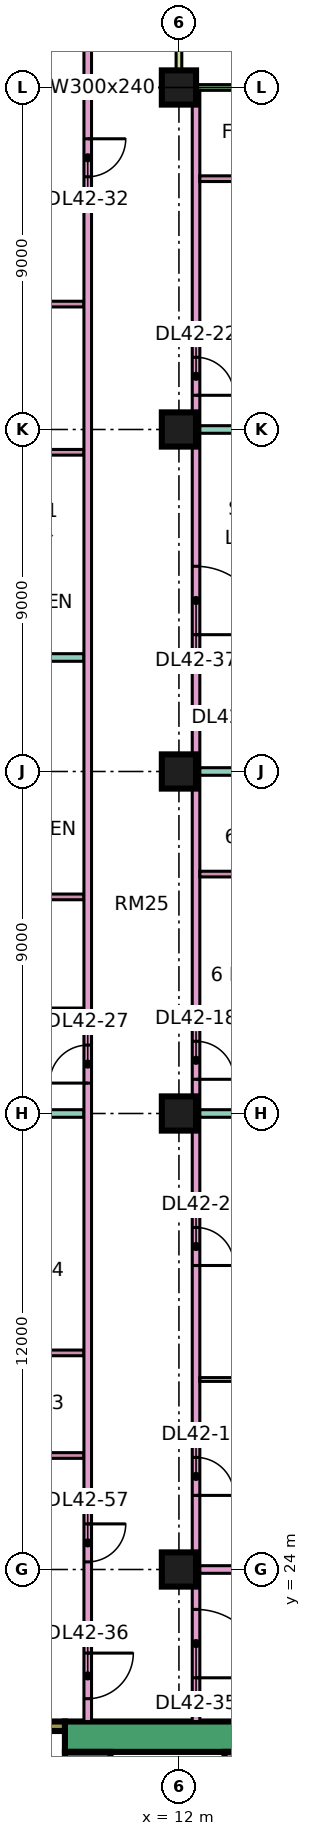
"""IFC4 building model, lengths in metres.
Left out: names, types, materials, properties, quantities, classifications, styles, units other than length and angle.
Written with IfcOpenShell. Run it as: python <this file> out.ifc"""

import sys

from ifc_helpers import new_model, si_unit, direction, frame, frame_2d, origin, origin_2d, place, context, subcontext, project, spatial, rectangle, extrude, element, fill, save


model = new_model("IFC4")
c1 = context("Model", 3, precision=1e-05, world=origin(), true_north=direction((0.0, 1.0)))
c2 = subcontext(c1, "Body", "Model", "MODEL_VIEW")
j1 = project(units=[si_unit("LENGTHUNIT", "METRE"), si_unit("PLANEANGLEUNIT", "RADIAN")], contexts=[c1])
p1 = place(None, origin())
s1 = spatial("IfcSite", under=j1, at=p1, CompositionType="ELEMENT")
p2 = place(p1, origin())
s2 = spatial("IfcBuilding", under=s1, at=p2, CompositionType="ELEMENT")
p3 = place(p2, frame((0.0, 0.0, 183.65)))
s3 = spatial("IfcBuildingStorey", under=s2, at=p3, CompositionType="ELEMENT", Elevation=183.65)
for number, where, z_axis, x_axis in (
    (1, (12.0, 24.0, 0.0), (0.0, 0.0, 1.0), (1.0, 0.0, 0.0)),
    (2, (12.0, 36.0, 0.0), (0.0, 0.0, 1.0), (1.0, 0.0, 0.0)),
    (3, (12.0, 45.0, 0.0), (0.0, 0.0, 1.0), (1.0, 0.0, 0.0)),
    (4, (12.0, 54.0, 0.0), (0.0, 0.0, 1.0), (1.0, 0.0, 0.0)),
    (5, (12.0, 63.0, 0.0), (0.0, 0.0, 1.0), (1.0, 0.0, 0.0)),
):
    element("IfcColumn", number, at=place(p3, frame(where, z_axis=z_axis, x_axis=x_axis)), inside=s3, PredefinedType="COLUMN", context=c2, shape_type="SweptSolid", body=[
        extrude(rectangle(XDim=0.9, YDim=0.9, at=origin_2d()), origin(), (0.0, 0.0, 1.0), 3.75),
    ])
p4 = place(p3, frame((9.0, 19.6, 0.0), z_axis=(0.0, 0.0, 1.0), x_axis=(1.0, 0.0, 0.0)))
e6 = element("IfcWall", 6, at=p4, inside=s3, PredefinedType="SHEAR", context=c2, shape_type="SweptSolid", body=[
    extrude(rectangle(XDim=25.0, YDim=0.8, at=frame_2d((12.5, 0.0))), origin(), (0.0, 0.0, 1.0), 3.75),
])
p5 = place(p4, frame((19.1, 0.0, 0.0)))
e7 = element("IfcOpeningElement", 7, at=p5, cuts=e6, PredefinedType="OPENING", context=c2, shape_type="SweptSolid", body=[
    extrude(rectangle(XDim=1.8, YDim=2.4, at=frame_2d((0.9, 1.2))), frame((0.0, 0.41, 0.0), z_axis=(0.0, -1.0, 0.0), x_axis=(1.0, 0.0, 0.0)), (0.0, 0.0, 1.0), 0.82),
])
p6 = place(p3, frame((9.6, 7.8, 0.0), z_axis=(0.0, 0.0, 1.0), x_axis=(0.0, 1.0, 0.0)))
e8 = element("IfcWall", 8, at=p6, inside=s3, PredefinedType="SHEAR", context=c2, shape_type="SweptSolid", body=[
    extrude(rectangle(XDim=11.4, YDim=1.2, at=frame_2d((5.7, 0.0))), origin(), (0.0, 0.0, 1.0), 3.75),
])
p7 = place(p6, frame((4.075, 0.0, 0.0)))
e9 = element("IfcOpeningElement", 9, at=p7, cuts=e8, PredefinedType="OPENING", context=c2, shape_type="SweptSolid", body=[
    extrude(rectangle(XDim=1.1, YDim=2.2, at=frame_2d((0.55, 1.1))), frame((0.0, 0.61, 0.0), z_axis=(0.0, -1.0, 0.0), x_axis=(1.0, 0.0, 0.0)), (0.0, 0.0, 1.0), 1.22),
])
p8 = place(p6, frame((6.575, 0.0, 0.0)))
e10 = element("IfcOpeningElement", 10, at=p8, cuts=e8, PredefinedType="OPENING", context=c2, shape_type="SweptSolid", body=[
    extrude(rectangle(XDim=1.1, YDim=2.2, at=frame_2d((0.55, 1.1))), frame((0.0, 0.61, 0.0), z_axis=(0.0, -1.0, 0.0), x_axis=(1.0, 0.0, 0.0)), (0.0, 0.0, 1.0), 1.22),
])
p9 = place(p6, frame((9.4, 0.0, 0.0)))
e11 = element("IfcOpeningElement", 11, at=p9, cuts=e8, PredefinedType="OPENING", context=c2, shape_type="SweptSolid", body=[
    extrude(rectangle(XDim=1.1, YDim=2.2, at=frame_2d((0.55, 1.1))), frame((0.0, 0.61, 0.0), z_axis=(0.0, -1.0, 0.0), x_axis=(1.0, 0.0, 0.0)), (0.0, 0.0, 1.0), 1.22),
])
p10 = place(p6, frame((1.75, 0.0, 0.0)))
e12 = element("IfcOpeningElement", 12, at=p10, cuts=e8, PredefinedType="OPENING", context=c2, shape_type="SweptSolid", body=[
    extrude(rectangle(XDim=0.9, YDim=2.1, at=frame_2d((0.45, 1.05))), frame((0.0, 0.61, 0.0), z_axis=(0.0, -1.0, 0.0), x_axis=(1.0, 0.0, 0.0)), (0.0, 0.0, 1.0), 1.22),
])
p11 = place(p3, frame((13.325, 7.8, 0.0), z_axis=(0.0, 0.0, 1.0), x_axis=(0.0, 1.0, 0.0)))
e13 = element("IfcWall", 13, at=p11, inside=s3, PredefinedType="SHEAR", context=c2, shape_type="SweptSolid", body=[
    extrude(rectangle(XDim=11.4, YDim=0.25, at=frame_2d((5.7, 0.0))), origin(), (0.0, 0.0, 1.0), 3.75),
])
p12 = place(p3, frame((2.1, 19.875, 0.0), z_axis=(0.0, 0.0, 1.0), x_axis=(1.0, 0.0, 0.0)))
e14 = element("IfcWall", 14, at=p12, inside=s3, PredefinedType="SHEAR", context=c2, shape_type="SweptSolid", body=[
    extrude(rectangle(XDim=6.9, YDim=0.25, at=frame_2d((3.45, 0.0))), origin(), (0.0, 0.0, 1.0), 3.75),
])
p13 = place(p12, frame((1.175, 0.0, 0.0)))
e15 = element("IfcOpeningElement", 15, at=p13, cuts=e14, PredefinedType="OPENING", context=c2, shape_type="SweptSolid", body=[
    extrude(rectangle(XDim=1.1, YDim=2.2, at=frame_2d((0.55, 1.1))), frame((0.0, 0.135, 0.0), z_axis=(0.0, -1.0, 0.0), x_axis=(1.0, 0.0, 0.0)), (0.0, 0.0, 1.0), 0.27),
])
p14 = place(p12, frame((4.6, 0.0, 0.0)))
e16 = element("IfcOpeningElement", 16, at=p14, cuts=e14, PredefinedType="OPENING", context=c2, shape_type="SweptSolid", body=[
    extrude(rectangle(XDim=1.2, YDim=2.2, at=frame_2d((0.6, 1.1))), frame((0.0, 0.135, 0.0), z_axis=(0.0, -1.0, 0.0), x_axis=(1.0, 0.0, 0.0)), (0.0, 0.0, 1.0), 0.27),
])
p15 = place(p3, frame((22.425, 63.0, 0.0), z_axis=(0.0, 0.0, 1.0), x_axis=(-1.0, 0.0, 0.0)))
e17 = element("IfcWall", 17, at=p15, inside=s3, PredefinedType="SOLIDWALL", context=c2, shape_type="SweptSolid", body=[
    extrude(rectangle(XDim=10.35, YDim=0.15, at=frame_2d((5.175, 0.0))), origin(), (0.0, 0.0, 1.0), 3.35),
])
p16 = place(p15, frame((0.788, 0.0, 0.0)))
e18 = element("IfcOpeningElement", 18, at=p16, cuts=e17, PredefinedType="OPENING", context=c2, shape_type="SweptSolid", body=[
    extrude(rectangle(XDim=1.8, YDim=2.4, at=frame_2d((0.9, 1.2))), frame((0.0, 0.085, 0.0), z_axis=(0.0, -1.0, 0.0), x_axis=(1.0, 0.0, 0.0)), (0.0, 0.0, 1.0), 0.17),
])
p17 = place(p15, frame((5.725, 0.0, 0.45)))
e19 = element("IfcOpeningElement", 19, at=p17, cuts=e17, PredefinedType="OPENING", context=c2, shape_type="SweptSolid", body=[
    extrude(rectangle(XDim=3.0, YDim=2.4, at=frame_2d((1.5, 1.2))), frame((0.0, 0.085, 0.0), z_axis=(0.0, -1.0, 0.0), x_axis=(1.0, 0.0, 0.0)), (0.0, 0.0, 1.0), 0.17),
])
p18 = place(p3, frame((12.0, 64.5, 0.0), z_axis=(0.0, 0.0, 1.0), x_axis=(0.0, -1.0, 0.0)))
e20 = element("IfcWall", 20, at=p18, inside=s3, PredefinedType="SOLIDWALL", context=c2, shape_type="SweptSolid", body=[
    extrude(rectangle(XDim=1.5, YDim=0.15, at=frame_2d((0.75, 0.0))), origin(), (0.0, 0.0, 1.0), 3.35),
])
p19 = place(p3, frame((0.0, 36.0, 0.0), z_axis=(0.0, 0.0, 1.0), x_axis=(1.0, 0.0, 0.0)))
e21 = element("IfcWall", 21, at=p19, inside=s3, PredefinedType="PARTITIONING", context=c2, shape_type="SweptSolid", body=[
    extrude(rectangle(XDim=9.5, YDim=0.2, at=frame_2d((4.75, 0.0))), origin(), (0.0, 0.0, 1.0), 3.35),
])
p20 = place(p3, frame((0.074, 22.4, 0.0), z_axis=(0.0, 0.0, 1.0), x_axis=(1.0, 0.0, 0.0)))
e22 = element("IfcWall", 22, at=p20, inside=s3, PredefinedType="PARTITIONING", context=c2, shape_type="SweptSolid", body=[
    extrude(rectangle(XDim=9.426, YDim=0.2, at=frame_2d((4.713, 0.0))), origin(), (0.0, 0.0, 1.0), 3.35),
])
for number, where, z_axis, x_axis in (
    (23, (6.375, 38.7, 0.0), (0.0, 0.0, 1.0), (1.0, 0.0, 0.0)),
    (24, (6.375, 41.7, 0.0), (0.0, 0.0, 1.0), (1.0, 0.0, 0.0)),
):
    element("IfcWall", number, at=place(p3, frame(where, z_axis=z_axis, x_axis=x_axis)), inside=s3, PredefinedType="PARTITIONING", context=c2, shape_type="SweptSolid", body=[
        extrude(rectangle(XDim=3.125, YDim=0.15, at=frame_2d((1.562, 0.0))), origin(), (0.0, 0.0, 1.0), 3.35),
    ])
p21 = place(p3, frame((6.525, 48.0, 0.0), z_axis=(0.0, 0.0, 1.0), x_axis=(1.0, 0.0, 0.0)))
e25 = element("IfcWall", 25, at=p21, inside=s3, PredefinedType="PARTITIONING", context=c2, shape_type="SweptSolid", body=[
    extrude(rectangle(XDim=2.975, YDim=0.2, at=frame_2d((1.488, 0.0))), origin(), (0.0, 0.0, 1.0), 3.35),
])
for number, where, z_axis, x_axis in (
    (26, (6.675, 53.4, 0.0), (0.0, 0.0, 1.0), (1.0, 0.0, 0.0)),
    (27, (6.675, 57.3, 0.0), (0.0, 0.0, 1.0), (1.0, 0.0, 0.0)),
):
    element("IfcWall", number, at=place(p3, frame(where, z_axis=z_axis, x_axis=x_axis)), inside=s3, PredefinedType="PARTITIONING", context=c2, shape_type="SweptSolid", body=[
        extrude(rectangle(XDim=2.825, YDim=0.15, at=frame_2d((1.413, 0.0))), origin(), (0.0, 0.0, 1.0), 3.35),
    ])
for number, where, z_axis, x_axis in (
    (28, (6.975, 27.0, 0.0), (0.0, 0.0, 1.0), (1.0, 0.0, 0.0)),
    (29, (6.975, 29.7, 0.0), (0.0, 0.0, 1.0), (1.0, 0.0, 0.0)),
):
    element("IfcWall", number, at=place(p3, frame(where, z_axis=z_axis, x_axis=x_axis)), inside=s3, PredefinedType="PARTITIONING", context=c2, shape_type="SweptSolid", body=[
        extrude(rectangle(XDim=2.525, YDim=0.15, at=frame_2d((1.262, 0.0))), origin(), (0.0, 0.0, 1.0), 3.35),
    ])
p22 = place(p3, frame((9.6, 20.0, 0.0), z_axis=(0.0, 0.0, 1.0), x_axis=(0.0, 1.0, 0.0)))
e30 = element("IfcWall", 30, at=p22, inside=s3, PredefinedType="PARTITIONING", context=c2, shape_type="SweptSolid", body=[
    extrude(rectangle(XDim=44.35, YDim=0.2, at=frame_2d((22.175, 0.0))), origin(), (0.0, 0.0, 1.0), 3.35),
])
p23 = place(p22, frame((16.8, 0.0, 0.0)))
e31 = element("IfcOpeningElement", 31, at=p23, cuts=e30, PredefinedType="OPENING", context=c2, shape_type="SweptSolid", body=[
    extrude(rectangle(XDim=1.0, YDim=2.1, at=frame_2d((0.5, 1.05))), frame((0.0, 0.11, 0.0), z_axis=(0.0, -1.0, 0.0), x_axis=(1.0, 0.0, 0.0)), (0.0, 0.0, 1.0), 0.22),
])
p24 = place(p22, frame((40.65, 0.0, 0.0)))
e32 = element("IfcOpeningElement", 32, at=p24, cuts=e30, PredefinedType="OPENING", context=c2, shape_type="SweptSolid", body=[
    extrude(rectangle(XDim=1.0, YDim=2.1, at=frame_2d((0.5, 1.05))), frame((0.0, 0.11, 0.0), z_axis=(0.0, -1.0, 0.0), x_axis=(1.0, 0.0, 0.0)), (0.0, 0.0, 1.0), 0.22),
])
p25 = place(p22, frame((0.6, 0.0, 0.0)))
e33 = element("IfcOpeningElement", 33, at=p25, cuts=e30, PredefinedType="OPENING", context=c2, shape_type="SweptSolid", body=[
    extrude(rectangle(XDim=1.2, YDim=2.1, at=frame_2d((0.6, 1.05))), frame((0.0, 0.11, 0.0), z_axis=(0.0, -1.0, 0.0), x_axis=(1.0, 0.0, 0.0)), (0.0, 0.0, 1.0), 0.22),
])
p26 = place(p22, frame((4.2, 0.0, 0.0)))
e34 = element("IfcOpeningElement", 34, at=p26, cuts=e30, PredefinedType="OPENING", context=c2, shape_type="SweptSolid", body=[
    extrude(rectangle(XDim=1.0, YDim=2.1, at=frame_2d((0.5, 1.05))), frame((0.0, 0.11, 0.0), z_axis=(0.0, -1.0, 0.0), x_axis=(1.0, 0.0, 0.0)), (0.0, 0.0, 1.0), 0.22),
])
p27 = place(p3, frame((12.45, 20.0, 0.0), z_axis=(0.0, 0.0, 1.0), x_axis=(0.0, 1.0, 0.0)))
e35 = element("IfcWall", 35, at=p27, inside=s3, PredefinedType="PARTITIONING", context=c2, shape_type="SweptSolid", body=[
    extrude(rectangle(XDim=42.926, YDim=0.2, at=frame_2d((21.463, 0.0))), origin(), (0.0, 0.0, 1.0), 3.35),
])
p28 = place(p27, frame((5.95, 0.0, 0.0)))
e36 = element("IfcOpeningElement", 36, at=p28, cuts=e35, PredefinedType="OPENING", context=c2, shape_type="SweptSolid", body=[
    extrude(rectangle(XDim=1.0, YDim=2.1, at=frame_2d((0.5, 1.05))), frame((0.0, 0.11, 0.0), z_axis=(0.0, -1.0, 0.0), x_axis=(1.0, 0.0, 0.0)), (0.0, 0.0, 1.0), 0.22),
])
p29 = place(p27, frame((12.0, 0.0, 0.0)))
e37 = element("IfcOpeningElement", 37, at=p29, cuts=e35, PredefinedType="OPENING", context=c2, shape_type="SweptSolid", body=[
    extrude(rectangle(XDim=1.0, YDim=2.1, at=frame_2d((0.5, 1.05))), frame((0.0, 0.11, 0.0), z_axis=(0.0, -1.0, 0.0), x_axis=(1.0, 0.0, 0.0)), (0.0, 0.0, 1.0), 0.22),
])
p30 = place(p27, frame((16.9, 0.0, 0.0)))
e38 = element("IfcOpeningElement", 38, at=p30, cuts=e35, PredefinedType="OPENING", context=c2, shape_type="SweptSolid", body=[
    extrude(rectangle(XDim=1.0, YDim=2.1, at=frame_2d((0.5, 1.05))), frame((0.0, 0.11, 0.0), z_axis=(0.0, -1.0, 0.0), x_axis=(1.0, 0.0, 0.0)), (0.0, 0.0, 1.0), 0.22),
])
p31 = place(p27, frame((34.9, 0.0, 0.0)))
e39 = element("IfcOpeningElement", 39, at=p31, cuts=e35, PredefinedType="OPENING", context=c2, shape_type="SweptSolid", body=[
    extrude(rectangle(XDim=1.0, YDim=2.1, at=frame_2d((0.5, 1.05))), frame((0.0, 0.11, 0.0), z_axis=(0.0, -1.0, 0.0), x_axis=(1.0, 0.0, 0.0)), (0.0, 0.0, 1.0), 0.22),
])
p32 = place(p27, frame((1.15, 0.0, 0.0)))
e40 = element("IfcOpeningElement", 40, at=p32, cuts=e35, PredefinedType="OPENING", context=c2, shape_type="SweptSolid", body=[
    extrude(rectangle(XDim=1.8, YDim=2.1, at=frame_2d((0.9, 1.05))), frame((0.0, 0.11, 0.0), z_axis=(0.0, -1.0, 0.0), x_axis=(1.0, 0.0, 0.0)), (0.0, 0.0, 1.0), 0.22),
])
p33 = place(p27, frame((28.6, 0.0, 0.0)))
e41 = element("IfcOpeningElement", 41, at=p33, cuts=e35, PredefinedType="OPENING", context=c2, shape_type="SweptSolid", body=[
    extrude(rectangle(XDim=1.8, YDim=2.1, at=frame_2d((0.9, 1.05))), frame((0.0, 0.11, 0.0), z_axis=(0.0, -1.0, 0.0), x_axis=(1.0, 0.0, 0.0)), (0.0, 0.0, 1.0), 0.22),
])
p34 = place(p3, frame((12.55, 24.0, 0.0), z_axis=(0.0, 0.0, 1.0), x_axis=(1.0, 0.0, 0.0)))
e42 = element("IfcWall", 42, at=p34, inside=s3, PredefinedType="PARTITIONING", context=c2, shape_type="SweptSolid", body=[
    extrude(rectangle(XDim=8.95, YDim=0.2, at=frame_2d((4.475, 0.0))), origin(), (0.0, 0.0, 1.0), 3.35),
])
p35 = place(p3, frame((12.55, 29.0, 0.0), z_axis=(0.0, 0.0, 1.0), x_axis=(1.0, 0.0, 0.0)))
e43 = element("IfcWall", 43, at=p35, inside=s3, PredefinedType="PARTITIONING", context=c2, shape_type="SweptSolid", body=[
    extrude(rectangle(XDim=8.95, YDim=0.1, at=frame_2d((4.475, 0.0))), origin(), (0.0, 0.0, 1.0), 3.35),
])
p36 = place(p3, frame((12.55, 36.0, 0.0), z_axis=(0.0, 0.0, 1.0), x_axis=(1.0, 0.0, 0.0)))
e44 = element("IfcWall", 44, at=p36, inside=s3, PredefinedType="PARTITIONING", context=c2, shape_type="SweptSolid", body=[
    extrude(rectangle(XDim=11.45, YDim=0.2, at=frame_2d((5.725, 0.0))), origin(), (0.0, 0.0, 1.0), 3.35),
])
for number, where, z_axis, x_axis in (
    (45, (12.55, 38.7, 0.0), (0.0, 0.0, 1.0), (1.0, 0.0, 0.0)),
    (46, (12.55, 42.3, 0.0), (0.0, 0.0, 1.0), (1.0, 0.0, 0.0)),
):
    element("IfcWall", number, at=place(p3, frame(where, z_axis=z_axis, x_axis=x_axis)), inside=s3, PredefinedType="PARTITIONING", context=c2, shape_type="SweptSolid", body=[
        extrude(rectangle(XDim=4.025, YDim=0.15, at=frame_2d((2.012, 0.0))), origin(), (0.0, 0.0, 1.0), 3.35),
    ])
p37 = place(p3, frame((12.55, 45.0, 0.0), z_axis=(0.0, 0.0, 1.0), x_axis=(1.0, 0.0, 0.0)))
e47 = element("IfcWall", 47, at=p37, inside=s3, PredefinedType="PARTITIONING", context=c2, shape_type="SweptSolid", body=[
    extrude(rectangle(XDim=11.376, YDim=0.2, at=frame_2d((5.688, 0.0))), origin(), (0.0, 0.0, 1.0), 3.35),
])
p38 = place(p3, frame((12.55, 54.0, 0.0), z_axis=(0.0, 0.0, 1.0), x_axis=(1.0, 0.0, 0.0)))
e48 = element("IfcWall", 48, at=p38, inside=s3, PredefinedType="PARTITIONING", context=c2, shape_type="SweptSolid", body=[
    extrude(rectangle(XDim=11.45, YDim=0.2, at=frame_2d((5.725, 0.0))), origin(), (0.0, 0.0, 1.0), 3.35),
])
for number, where, z_axis, x_axis in (
    (49, (12.55, 56.7, 0.0), (0.0, 0.0, 1.0), (1.0, 0.0, 0.0)),
    (50, (12.55, 60.6, 0.0), (0.0, 0.0, 1.0), (1.0, 0.0, 0.0)),
):
    element("IfcWall", number, at=place(p3, frame(where, z_axis=z_axis, x_axis=x_axis)), inside=s3, PredefinedType="PARTITIONING", context=c2, shape_type="SweptSolid", body=[
        extrude(rectangle(XDim=5.225, YDim=0.15, at=frame_2d((2.612, 0.0))), origin(), (0.0, 0.0, 1.0), 3.35),
    ])
p39 = place(p28, frame((1.0, 0.0, 0.0), z_axis=(0.0, 0.0, 1.0), x_axis=(-1.0, 0.0, 0.0)))
e51 = element("IfcDoor", 51, at=p39, inside=s3, OperationType="SINGLE_SWING_LEFT", PredefinedType="DOOR", context=c2, shape_type="SweptSolid", body=[
    extrude(rectangle(XDim=1.0, YDim=2.1, at=frame_2d((0.5, 1.05))), frame((0.0, 0.025, 0.0), z_axis=(0.0, -1.0, 0.0), x_axis=(1.0, 0.0, 0.0)), (0.0, 0.0, 1.0), 0.05),
])
fill(e36, e51)
p40 = place(p29, frame((1.0, 0.0, 0.0), z_axis=(0.0, 0.0, 1.0), x_axis=(-1.0, 0.0, 0.0)))
e52 = element("IfcDoor", 52, at=p40, inside=s3, OperationType="SINGLE_SWING_LEFT", PredefinedType="DOOR", context=c2, shape_type="SweptSolid", body=[
    extrude(rectangle(XDim=1.0, YDim=2.1, at=frame_2d((0.5, 1.05))), frame((0.0, 0.025, 0.0), z_axis=(0.0, -1.0, 0.0), x_axis=(1.0, 0.0, 0.0)), (0.0, 0.0, 1.0), 0.05),
])
fill(e37, e52)
p41 = place(p30, frame((1.0, 0.0, 0.0), z_axis=(0.0, 0.0, 1.0), x_axis=(-1.0, 0.0, 0.0)))
e53 = element("IfcDoor", 53, at=p41, inside=s3, OperationType="SINGLE_SWING_LEFT", PredefinedType="DOOR", context=c2, shape_type="SweptSolid", body=[
    extrude(rectangle(XDim=1.0, YDim=2.1, at=frame_2d((0.5, 1.05))), frame((0.0, 0.025, 0.0), z_axis=(0.0, -1.0, 0.0), x_axis=(1.0, 0.0, 0.0)), (0.0, 0.0, 1.0), 0.05),
])
fill(e38, e53)
p42 = place(p31, frame((1.0, 0.0, 0.0), z_axis=(0.0, 0.0, 1.0), x_axis=(-1.0, 0.0, 0.0)))
e54 = element("IfcDoor", 54, at=p42, inside=s3, OperationType="SINGLE_SWING_LEFT", PredefinedType="DOOR", context=c2, shape_type="SweptSolid", body=[
    extrude(rectangle(XDim=1.0, YDim=2.1, at=frame_2d((0.5, 1.05))), frame((0.0, 0.025, 0.0), z_axis=(0.0, -1.0, 0.0), x_axis=(1.0, 0.0, 0.0)), (0.0, 0.0, 1.0), 0.05),
])
fill(e39, e54)
p43 = place(p23, origin())
e55 = element("IfcDoor", 55, at=p43, inside=s3, OperationType="SINGLE_SWING_LEFT", PredefinedType="DOOR", context=c2, shape_type="SweptSolid", body=[
    extrude(rectangle(XDim=1.0, YDim=2.1, at=frame_2d((0.5, 1.05))), frame((0.0, 0.025, 0.0), z_axis=(0.0, -1.0, 0.0), x_axis=(1.0, 0.0, 0.0)), (0.0, 0.0, 1.0), 0.05),
])
fill(e31, e55)
p44 = place(p24, origin())
e56 = element("IfcDoor", 56, at=p44, inside=s3, OperationType="SINGLE_SWING_RIGHT", PredefinedType="DOOR", context=c2, shape_type="SweptSolid", body=[
    extrude(rectangle(XDim=1.0, YDim=2.1, at=frame_2d((0.5, 1.05))), frame((0.0, 0.025, 0.0), z_axis=(0.0, -1.0, 0.0), x_axis=(1.0, 0.0, 0.0)), (0.0, 0.0, 1.0), 0.05),
])
fill(e32, e56)
p45 = place(p32, frame((1.8, 0.0, 0.0), z_axis=(0.0, 0.0, 1.0), x_axis=(-1.0, 0.0, 0.0)))
e57 = element("IfcDoor", 57, at=p45, inside=s3, OperationType="DOUBLE_DOOR_SINGLE_SWING", PredefinedType="DOOR", context=c2, shape_type="SweptSolid", body=[
    extrude(rectangle(XDim=1.8, YDim=2.1, at=frame_2d((0.9, 1.05))), frame((0.0, 0.025, 0.0), z_axis=(0.0, -1.0, 0.0), x_axis=(1.0, 0.0, 0.0)), (0.0, 0.0, 1.0), 0.05),
])
fill(e40, e57)
p46 = place(p25, origin())
e58 = element("IfcDoor", 58, at=p46, inside=s3, OperationType="SINGLE_SWING_RIGHT", PredefinedType="DOOR", context=c2, shape_type="SweptSolid", body=[
    extrude(rectangle(XDim=1.2, YDim=2.1, at=frame_2d((0.6, 1.05))), frame((0.0, 0.025, 0.0), z_axis=(0.0, -1.0, 0.0), x_axis=(1.0, 0.0, 0.0)), (0.0, 0.0, 1.0), 0.05),
])
fill(e33, e58)
p47 = place(p33, frame((1.8, 0.0, 0.0), z_axis=(0.0, 0.0, 1.0), x_axis=(-1.0, 0.0, 0.0)))
e59 = element("IfcDoor", 59, at=p47, inside=s3, OperationType="DOUBLE_DOOR_SINGLE_SWING", PredefinedType="DOOR", context=c2, shape_type="SweptSolid", body=[
    extrude(rectangle(XDim=1.8, YDim=2.1, at=frame_2d((0.9, 1.05))), frame((0.0, 0.025, 0.0), z_axis=(0.0, -1.0, 0.0), x_axis=(1.0, 0.0, 0.0)), (0.0, 0.0, 1.0), 0.05),
])
fill(e41, e59)
p48 = place(p26, origin())
e60 = element("IfcDoor", 60, at=p48, inside=s3, OperationType="SINGLE_SWING_RIGHT", PredefinedType="DOOR", context=c2, shape_type="SweptSolid", body=[
    extrude(rectangle(XDim=1.0, YDim=2.1, at=frame_2d((0.5, 1.05))), frame((0.0, 0.025, 0.0), z_axis=(0.0, -1.0, 0.0), x_axis=(1.0, 0.0, 0.0)), (0.0, 0.0, 1.0), 0.05),
])
fill(e34, e60)
save(model, sys.argv[1])
